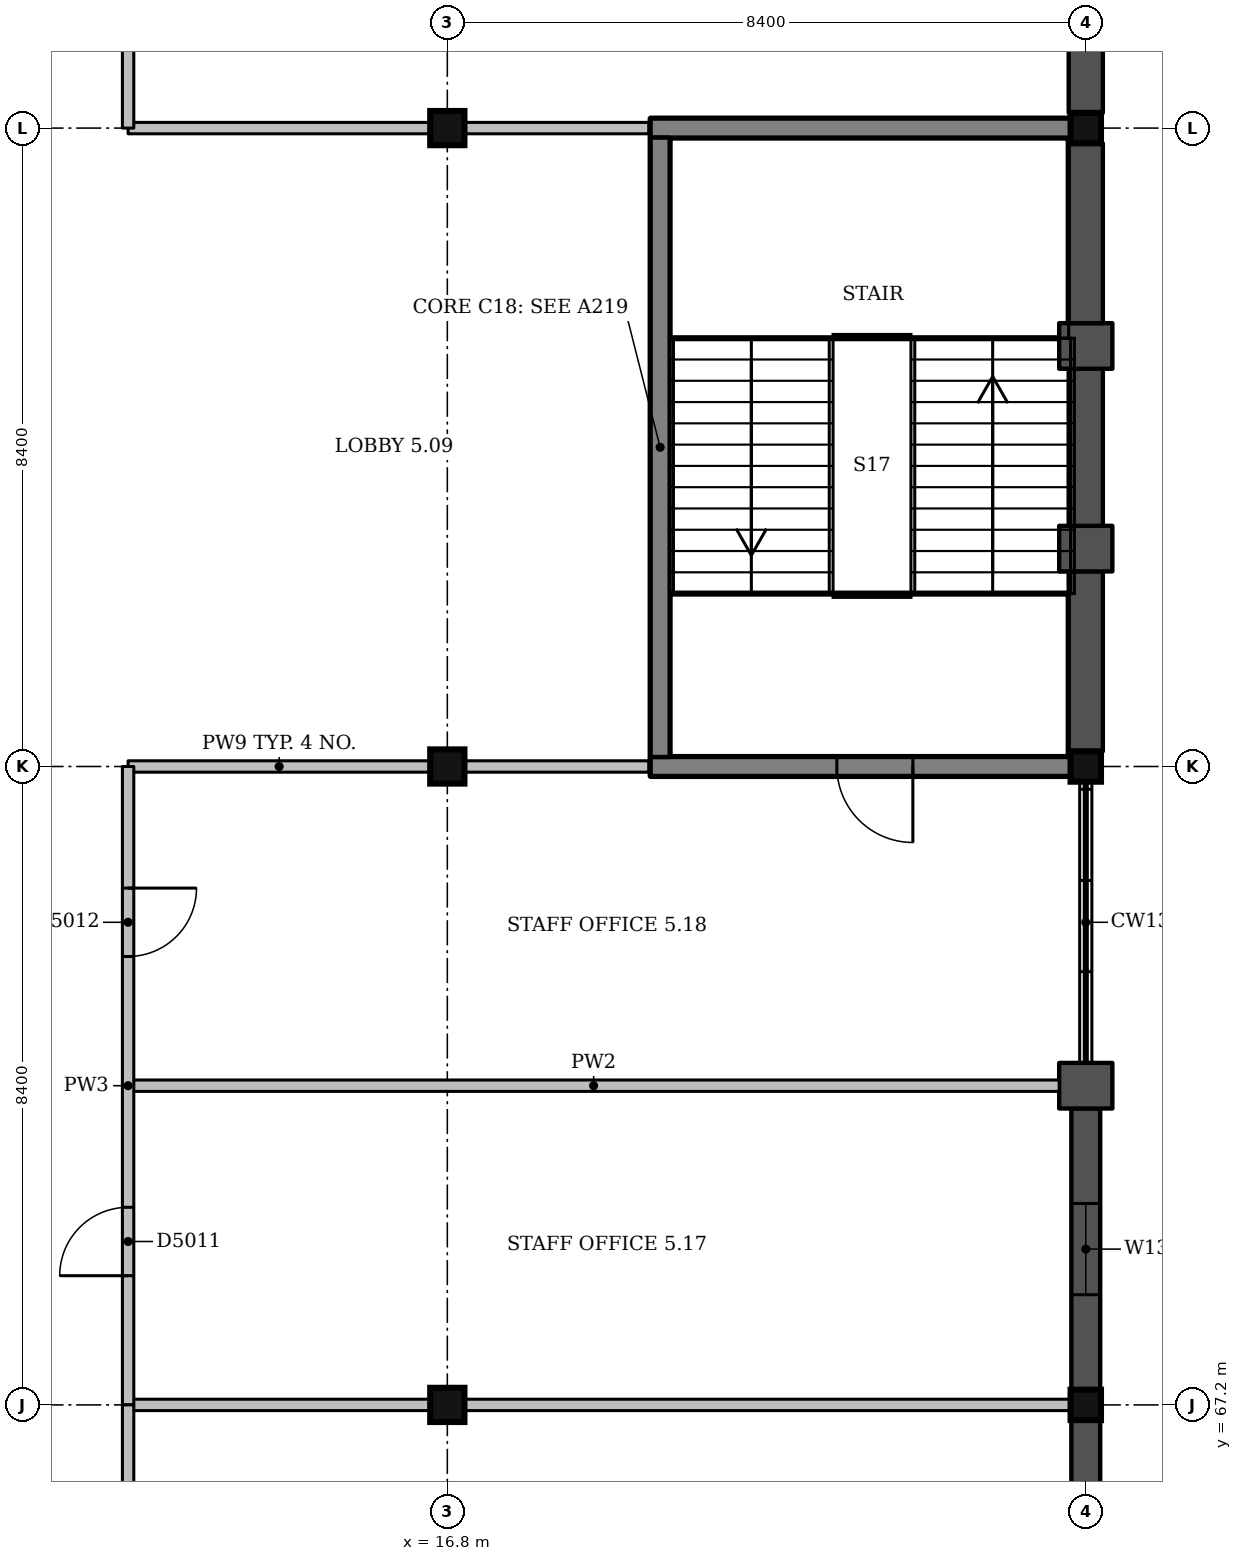
"""IFC4 building model, lengths in metres.
Left out: names, types, materials, properties, quantities, classifications, styles, units other than length and angle.
Written with IfcOpenShell. Run it as: python <this file> out.ifc"""

import sys

from ifc_helpers import new_model, si_unit, direction, frame, frame_2d, origin, origin_2d, place, context, subcontext, project, spatial, rectangle, extrude, element, fill, save


model = new_model("IFC4")
c1 = context("Model", 3, precision=1e-05, world=origin(), true_north=direction((0.0, 1.0)))
c2 = subcontext(c1, "Body", "Model", "MODEL_VIEW")
j1 = project(units=[si_unit("LENGTHUNIT", "METRE"), si_unit("PLANEANGLEUNIT", "RADIAN")], contexts=[c1])
p1 = place(None, origin())
s1 = spatial("IfcSite", under=j1, at=p1, CompositionType="ELEMENT")
p2 = place(p1, origin())
s2 = spatial("IfcBuilding", under=s1, at=p2, CompositionType="ELEMENT")
p3 = place(p2, frame((0.0, 0.0, 22.5)))
s3 = spatial("IfcBuildingStorey", under=s2, at=p3, CompositionType="ELEMENT", Elevation=22.5)
for number, where, z_axis, x_axis in (
    (1, (16.8, 67.2, 0.0), (0.0, 0.0, 1.0), (1.0, 0.0, 0.0)),
    (2, (16.8, 75.6, 0.0), (0.0, 0.0, 1.0), (1.0, 0.0, 0.0)),
    (3, (16.8, 84.0, 0.0), (0.0, 0.0, 1.0), (1.0, 0.0, 0.0)),
):
    element("IfcColumn", number, at=place(p3, frame(where, z_axis=z_axis, x_axis=x_axis)), inside=s3, PredefinedType="COLUMN", context=c2, shape_type="SweptSolid", body=[
        extrude(rectangle(XDim=0.45, YDim=0.45, at=origin_2d()), origin(), (0.0, 0.0, 1.0), 4.5),
    ])
for number, where, z_axis, x_axis in (
    (4, (25.2, 67.2, 0.0), (0.0, 0.0, 1.0), (1.0, 0.0, 0.0)),
    (5, (25.2, 75.6, 0.0), (0.0, 0.0, 1.0), (1.0, 0.0, 0.0)),
    (6, (25.2, 84.0, 0.0), (0.0, 0.0, 1.0), (1.0, 0.0, 0.0)),
):
    element("IfcColumn", number, at=place(p3, frame(where, z_axis=z_axis, x_axis=x_axis)), inside=s3, PredefinedType="COLUMN", context=c2, shape_type="SweptSolid", body=[
        extrude(rectangle(XDim=0.4, YDim=0.4, at=origin_2d()), origin(), (0.0, 0.0, 1.0), 4.5),
    ])
p4 = place(p3, frame((19.475, 75.6, 0.0), z_axis=(0.0, 0.0, 1.0), x_axis=(1.0, 0.0, 0.0)))
e7 = element("IfcWall", 7, at=p4, inside=s3, PredefinedType="SHEAR", context=c2, shape_type="SweptSolid", body=[
    extrude(rectangle(XDim=5.525, YDim=0.25, at=frame_2d((2.762, 0.0))), origin(), (0.0, 0.0, 1.0), 4.5),
])
p5 = place(p4, frame((2.45, 0.0, 0.0)))
e8 = element("IfcOpeningElement", 8, at=p5, cuts=e7, PredefinedType="OPENING", context=c2, shape_type="SweptSolid", body=[
    extrude(rectangle(XDim=1.0, YDim=2.1, at=frame_2d((0.5, 1.05))), frame((0.0, 0.135, 0.0), z_axis=(0.0, -1.0, 0.0), x_axis=(1.0, 0.0, 0.0)), (0.0, 0.0, 1.0), 0.27),
])
p6 = place(p3, frame((19.475, 84.0, 0.0), z_axis=(0.0, 0.0, 1.0), x_axis=(1.0, 0.0, 0.0)))
e9 = element("IfcWall", 9, at=p6, inside=s3, PredefinedType="SHEAR", context=c2, shape_type="SweptSolid", body=[
    extrude(rectangle(XDim=5.525, YDim=0.25, at=frame_2d((2.762, 0.0))), origin(), (0.0, 0.0, 1.0), 4.5),
])
p7 = place(p3, frame((19.6, 75.725, 0.0), z_axis=(0.0, 0.0, 1.0), x_axis=(0.0, 1.0, 0.0)))
e10 = element("IfcWall", 10, at=p7, inside=s3, PredefinedType="SHEAR", context=c2, shape_type="SweptSolid", body=[
    extrude(rectangle(XDim=8.15, YDim=0.25, at=frame_2d((4.075, 0.0))), origin(), (0.0, 0.0, 1.0), 4.5),
])
p8 = place(p3, frame((25.2, 64.633, 0.0), z_axis=(0.0, 0.0, 1.0), x_axis=(0.0, 1.0, 0.0)))
e11 = element("IfcWall", 11, at=p8, inside=s3, PredefinedType="SOLIDWALL", context=c2, shape_type="SweptSolid", body=[
    extrude(rectangle(XDim=2.367, YDim=0.38, at=frame_2d((1.183, 0.0))), origin(), (0.0, 0.0, 1.0), 3.35),
])
p9 = place(p3, frame((25.2, 67.4, 0.0), z_axis=(0.0, 0.0, 1.0), x_axis=(0.0, 1.0, 0.0)))
e12 = element("IfcWall", 12, at=p9, inside=s3, PredefinedType="SOLIDWALL", context=c2, shape_type="SweptSolid", body=[
    extrude(rectangle(XDim=3.7, YDim=0.38, at=frame_2d((1.85, 0.0))), origin(), (0.0, 0.0, 1.0), 3.35),
])
p10 = place(p9, frame((1.25, 0.0, 0.9)))
e13 = element("IfcOpeningElement", 13, at=p10, cuts=e12, PredefinedType="OPENING", context=c2, shape_type="SweptSolid", body=[
    extrude(rectangle(XDim=1.2, YDim=2.1, at=frame_2d((0.6, 1.05))), frame((0.0, 0.2, 0.0), z_axis=(0.0, -1.0, 0.0), x_axis=(1.0, 0.0, 0.0)), (0.0, 0.0, 1.0), 0.4),
])
p11 = place(p3, frame((25.2, 71.1, 0.0), z_axis=(0.0, 0.0, 1.0), x_axis=(0.0, 1.0, 0.0)))
e14 = element("IfcWall", 14, at=p11, inside=s3, PredefinedType="SOLIDWALL", context=c2, shape_type="SweptSolid", body=[
    extrude(rectangle(XDim=0.6, YDim=0.7, at=frame_2d((0.3, 0.0))), origin(), (0.0, 0.0, 1.0), 3.35),
])
p12 = place(p3, frame((25.2, 75.8, 0.0), z_axis=(0.0, 0.0, 1.0), x_axis=(0.0, 1.0, 0.0)))
e15 = element("IfcWall", 15, at=p12, inside=s3, PredefinedType="SOLIDWALL", context=c2, shape_type="SweptSolid", body=[
    extrude(rectangle(XDim=2.367, YDim=0.45, at=frame_2d((1.183, 0.0))), origin(), (0.0, 0.0, 1.0), 3.65),
])
p13 = place(p3, frame((25.2, 78.167, 0.0), z_axis=(0.0, 0.0, 1.0), x_axis=(0.0, 1.0, 0.0)))
e16 = element("IfcWall", 16, at=p13, inside=s3, PredefinedType="SOLIDWALL", context=c2, shape_type="SweptSolid", body=[
    extrude(rectangle(XDim=0.6, YDim=0.7, at=frame_2d((0.3, 0.0))), origin(), (0.0, 0.0, 1.0), 3.65),
])
p14 = place(p3, frame((25.2, 78.767, 0.0), z_axis=(0.0, 0.0, 1.0), x_axis=(0.0, 1.0, 0.0)))
e17 = element("IfcWall", 17, at=p14, inside=s3, PredefinedType="SOLIDWALL", context=c2, shape_type="SweptSolid", body=[
    extrude(rectangle(XDim=2.067, YDim=0.45, at=frame_2d((1.033, 0.0))), origin(), (0.0, 0.0, 1.0), 3.65),
])
p15 = place(p3, frame((25.2, 80.833, 0.0), z_axis=(0.0, 0.0, 1.0), x_axis=(0.0, 1.0, 0.0)))
e18 = element("IfcWall", 18, at=p15, inside=s3, PredefinedType="SOLIDWALL", context=c2, shape_type="SweptSolid", body=[
    extrude(rectangle(XDim=0.6, YDim=0.7, at=frame_2d((0.3, 0.0))), origin(), (0.0, 0.0, 1.0), 3.65),
])
p16 = place(p3, frame((25.2, 81.433, 0.0), z_axis=(0.0, 0.0, 1.0), x_axis=(0.0, 1.0, 0.0)))
e19 = element("IfcWall", 19, at=p16, inside=s3, PredefinedType="SOLIDWALL", context=c2, shape_type="SweptSolid", body=[
    extrude(rectangle(XDim=2.367, YDim=0.45, at=frame_2d((1.183, 0.0))), origin(), (0.0, 0.0, 1.0), 3.65),
])
p17 = place(p3, frame((25.2, 84.2, 0.0), z_axis=(0.0, 0.0, 1.0), x_axis=(0.0, 1.0, 0.0)))
e20 = element("IfcWall", 20, at=p17, inside=s3, PredefinedType="SOLIDWALL", context=c2, shape_type="SweptSolid", body=[
    extrude(rectangle(XDim=2.367, YDim=0.45, at=frame_2d((1.183, 0.0))), origin(), (0.0, 0.0, 1.0), 3.35),
])
p18 = place(p3, frame((12.6, 67.2, 0.0), z_axis=(0.0, 0.0, 1.0), x_axis=(1.0, 0.0, 0.0)))
e21 = element("IfcWall", 21, at=p18, inside=s3, PredefinedType="PARTITIONING", context=c2, shape_type="SweptSolid", body=[
    extrude(rectangle(XDim=3.975, YDim=0.15, at=frame_2d((1.987, 0.0))), origin(), (0.0, 0.0, 1.0), 3.4),
])
p19 = place(p3, frame((17.025, 67.2, 0.0), z_axis=(0.0, 0.0, 1.0), x_axis=(1.0, 0.0, 0.0)))
e22 = element("IfcWall", 22, at=p19, inside=s3, PredefinedType="PARTITIONING", context=c2, shape_type="SweptSolid", body=[
    extrude(rectangle(XDim=7.975, YDim=0.15, at=frame_2d((3.988, 0.0))), origin(), (0.0, 0.0, 1.0), 3.35),
])
p20 = place(p3, frame((12.6, 71.4, 0.0), z_axis=(0.0, 0.0, 1.0), x_axis=(1.0, 0.0, 0.0)))
e23 = element("IfcWall", 23, at=p20, inside=s3, PredefinedType="PARTITIONING", context=c2, shape_type="SweptSolid", body=[
    extrude(rectangle(XDim=12.25, YDim=0.15, at=frame_2d((6.125, 0.0))), origin(), (0.0, 0.0, 1.0), 3.4),
])
p21 = place(p3, frame((12.6, 75.6, 0.0), z_axis=(0.0, 0.0, 1.0), x_axis=(1.0, 0.0, 0.0)))
e24 = element("IfcWall", 24, at=p21, inside=s3, PredefinedType="PARTITIONING", context=c2, shape_type="SweptSolid", body=[
    extrude(rectangle(XDim=3.975, YDim=0.15, at=frame_2d((1.987, 0.0))), origin(), (0.0, 0.0, 1.0), 3.4),
])
p22 = place(p3, frame((17.025, 75.6, 0.0), z_axis=(0.0, 0.0, 1.0), x_axis=(1.0, 0.0, 0.0)))
e25 = element("IfcWall", 25, at=p22, inside=s3, PredefinedType="PARTITIONING", context=c2, shape_type="SweptSolid", body=[
    extrude(rectangle(XDim=2.425, YDim=0.15, at=frame_2d((1.212, 0.0))), origin(), (0.0, 0.0, 1.0), 3.4),
])
p23 = place(p3, frame((12.6, 84.0, 0.0), z_axis=(0.0, 0.0, 1.0), x_axis=(1.0, 0.0, 0.0)))
e26 = element("IfcWall", 26, at=p23, inside=s3, PredefinedType="PARTITIONING", context=c2, shape_type="SweptSolid", body=[
    extrude(rectangle(XDim=3.975, YDim=0.15, at=frame_2d((1.987, 0.0))), origin(), (0.0, 0.0, 1.0), 3.4),
])
p24 = place(p3, frame((17.025, 84.0, 0.0), z_axis=(0.0, 0.0, 1.0), x_axis=(1.0, 0.0, 0.0)))
e27 = element("IfcWall", 27, at=p24, inside=s3, PredefinedType="PARTITIONING", context=c2, shape_type="SweptSolid", body=[
    extrude(rectangle(XDim=2.425, YDim=0.15, at=frame_2d((1.212, 0.0))), origin(), (0.0, 0.0, 1.0), 3.4),
])
p25 = place(p3, frame((12.6, 67.2, 0.0), z_axis=(0.0, 0.0, 1.0), x_axis=(0.0, 1.0, 0.0)))
e28 = element("IfcWall", 28, at=p25, inside=s3, PredefinedType="PARTITIONING", context=c2, shape_type="SweptSolid", body=[
    extrude(rectangle(XDim=8.4, YDim=0.15, at=frame_2d((4.2, 0.0))), origin(), (0.0, 0.0, 1.0), 3.4),
])
p26 = place(p25, frame((1.7, 0.0, 0.0)))
e29 = element("IfcOpeningElement", 29, at=p26, cuts=e28, PredefinedType="OPENING", context=c2, shape_type="SweptSolid", body=[
    extrude(rectangle(XDim=0.9, YDim=2.1, at=frame_2d((0.45, 1.05))), frame((0.0, 0.085, 0.0), z_axis=(0.0, -1.0, 0.0), x_axis=(1.0, 0.0, 0.0)), (0.0, 0.0, 1.0), 0.17),
])
p27 = place(p25, frame((5.9, 0.0, 0.0)))
e30 = element("IfcOpeningElement", 30, at=p27, cuts=e28, PredefinedType="OPENING", context=c2, shape_type="SweptSolid", body=[
    extrude(rectangle(XDim=0.9, YDim=2.1, at=frame_2d((0.45, 1.05))), frame((0.0, 0.085, 0.0), z_axis=(0.0, -1.0, 0.0), x_axis=(1.0, 0.0, 0.0)), (0.0, 0.0, 1.0), 0.17),
])
p28 = place(p3, frame((12.6, 84.0, 0.0), z_axis=(0.0, 0.0, 1.0), x_axis=(0.0, 1.0, 0.0)))
e31 = element("IfcWall", 31, at=p28, inside=s3, PredefinedType="PARTITIONING", context=c2, shape_type="SweptSolid", body=[
    extrude(rectangle(XDim=16.8, YDim=0.15, at=frame_2d((8.4, 0.0))), origin(), (0.0, 0.0, 1.0), 3.4),
])
p29 = place(p28, frame((3.8, 0.0, 0.0)))
e32 = element("IfcOpeningElement", 32, at=p29, cuts=e31, PredefinedType="OPENING", context=c2, shape_type="SweptSolid", body=[
    extrude(rectangle(XDim=0.9, YDim=2.1, at=frame_2d((0.45, 1.05))), frame((0.0, 0.085, 0.0), z_axis=(0.0, -1.0, 0.0), x_axis=(1.0, 0.0, 0.0)), (0.0, 0.0, 1.0), 0.17),
])
p30 = place(p28, frame((12.2, 0.0, 0.0)))
e33 = element("IfcOpeningElement", 33, at=p30, cuts=e31, PredefinedType="OPENING", context=c2, shape_type="SweptSolid", body=[
    extrude(rectangle(XDim=0.9, YDim=2.1, at=frame_2d((0.45, 1.05))), frame((0.0, 0.085, 0.0), z_axis=(0.0, -1.0, 0.0), x_axis=(1.0, 0.0, 0.0)), (0.0, 0.0, 1.0), 0.17),
])
p31 = place(p3, frame((12.6, 50.675, 0.0), z_axis=(0.0, 0.0, 1.0), x_axis=(0.0, 1.0, 0.0)))
e34 = element("IfcWall", 34, at=p31, inside=s3, PredefinedType="PARTITIONING", context=c2, shape_type="SweptSolid", body=[
    extrude(rectangle(XDim=16.525, YDim=0.15, at=frame_2d((8.262, 0.0))), origin(), (0.0, 0.0, 1.0), 3.4),
])
p32 = place(p31, frame((3.45, 0.0, 0.0)))
e35 = element("IfcOpeningElement", 35, at=p32, cuts=e34, PredefinedType="OPENING", context=c2, shape_type="SweptSolid", body=[
    extrude(rectangle(XDim=1.0, YDim=2.1, at=frame_2d((0.5, 1.05))), frame((0.0, 0.085, 0.0), z_axis=(0.0, -1.0, 0.0), x_axis=(1.0, 0.0, 0.0)), (0.0, 0.0, 1.0), 0.17),
])
p33 = place(p31, frame((11.925, 0.0, 0.0)))
e36 = element("IfcOpeningElement", 36, at=p33, cuts=e34, PredefinedType="OPENING", context=c2, shape_type="SweptSolid", body=[
    extrude(rectangle(XDim=1.0, YDim=2.1, at=frame_2d((0.5, 1.05))), frame((0.0, 0.085, 0.0), z_axis=(0.0, -1.0, 0.0), x_axis=(1.0, 0.0, 0.0)), (0.0, 0.0, 1.0), 0.17),
])
p34 = place(p10, origin())
e37 = element("IfcWindow", 37, at=p34, inside=s3, PartitioningType="SINGLE_PANEL", PredefinedType="WINDOW", context=c2, shape_type="SweptSolid", body=[
    extrude(rectangle(XDim=1.2, YDim=2.1, at=frame_2d((0.6, 1.05))), frame((0.0, 0.15, 0.0), z_axis=(0.0, -1.0, 0.0), x_axis=(1.0, 0.0, 0.0)), (0.0, 0.0, 1.0), 0.06),
])
fill(e13, e37)
p35 = place(p26, origin())
e38 = element("IfcDoor", 38, at=p35, inside=s3, OperationType="SINGLE_SWING_LEFT", PredefinedType="DOOR", context=c2, shape_type="SweptSolid", body=[
    extrude(rectangle(XDim=0.9, YDim=2.1, at=frame_2d((0.45, 1.05))), frame((0.0, 0.025, 0.0), z_axis=(0.0, -1.0, 0.0), x_axis=(1.0, 0.0, 0.0)), (0.0, 0.0, 1.0), 0.05),
])
fill(e29, e38)
p36 = place(p27, origin())
e39 = element("IfcDoor", 39, at=p36, inside=s3, OperationType="SINGLE_SWING_RIGHT", PredefinedType="DOOR", context=c2, shape_type="SweptSolid", body=[
    extrude(rectangle(XDim=0.9, YDim=2.1, at=frame_2d((0.45, 1.05))), frame((0.0, 0.025, 0.0), z_axis=(0.0, -1.0, 0.0), x_axis=(1.0, 0.0, 0.0)), (0.0, 0.0, 1.0), 0.05),
])
fill(e30, e39)
p37 = place(p5, origin())
e40 = element("IfcDoor", 40, at=p37, inside=s3, OperationType="SINGLE_SWING_RIGHT", PredefinedType="DOOR", context=c2, shape_type="SweptSolid", body=[
    extrude(rectangle(XDim=1.0, YDim=2.1, at=frame_2d((0.5, 1.05))), frame((0.0, 0.025, 0.0), z_axis=(0.0, -1.0, 0.0), x_axis=(1.0, 0.0, 0.0)), (0.0, 0.0, 1.0), 0.05),
])
fill(e8, e40)
save(model, sys.argv[1])
